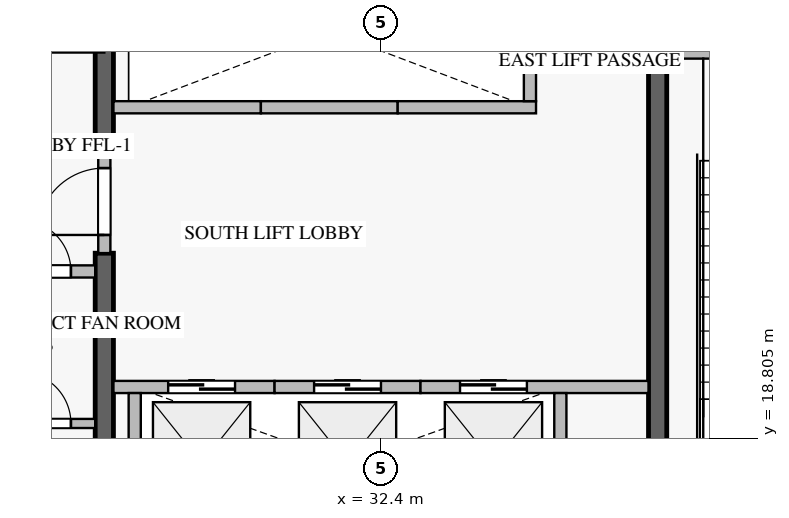
"""IFC4 building model, lengths in metres.
Left out: names, types, materials, properties, quantities, classifications, styles, units other than length and angle.
Written with IfcOpenShell. Run it as: python <this file> out.ifc"""

import sys

from ifc_helpers import new_model, si_unit, direction, frame, frame_2d, origin, place, context, subcontext, project, spatial, rectangle, extrude, source, transform, mapped, element, fill, save


model = new_model("IFC4")
c1 = context("Model", 3, precision=1e-05, world=origin(), true_north=direction((0.0, 1.0)))
c2 = subcontext(c1, "Body", "Model", "MODEL_VIEW")
j1 = project(units=[si_unit("LENGTHUNIT", "METRE"), si_unit("PLANEANGLEUNIT", "RADIAN")], contexts=[c1])
p1 = place(None, origin())
s1 = spatial("IfcSite", under=j1, at=p1, CompositionType="ELEMENT")
p2 = place(p1, origin())
s2 = spatial("IfcBuilding", under=s1, at=p2, CompositionType="ELEMENT")
p3 = place(p2, frame((0.0, 0.0, 15.3)))
s3 = spatial("IfcBuildingStorey", under=s2, at=p3, CompositionType="ELEMENT", Elevation=15.3)
p4 = place(p3, frame((27.85, 17.025, -0.38), z_axis=(0.0, 0.0, 1.0), x_axis=(0.0, 1.0, 0.0)))
e1 = element("IfcWall", 1, at=p4, inside=s3, PredefinedType="SHEAR", context=c2, shape_type="SweptSolid", body=[
    extrude(rectangle(XDim=4.825, YDim=0.3, at=frame_2d((2.413, 0.0))), origin(), (0.0, 0.0, 1.0), 5.228),
])
p5 = place(p3, frame((27.85, 23.55, -0.38), z_axis=(0.0, 0.0, 1.0), x_axis=(0.0, 1.0, 0.0)))
e2 = element("IfcWall", 2, at=p5, inside=s3, PredefinedType="SHEAR", context=c2, shape_type="SweptSolid", body=[
    extrude(rectangle(XDim=9.825, YDim=0.3, at=frame_2d((4.913, 0.0))), origin(), (0.0, 0.0, 1.0), 5.228),
])
p6 = place(p3, frame((36.95, 17.025, -0.38), z_axis=(0.0, 0.0, 1.0), x_axis=(0.0, 1.0, 0.0)))
e3 = element("IfcWall", 3, at=p6, inside=s3, PredefinedType="SHEAR", context=c2, shape_type="SweptSolid", body=[
    extrude(rectangle(XDim=8.325, YDim=0.3, at=frame_2d((4.163, 0.0))), origin(), (0.0, 0.0, 1.0), 5.228),
])
p7 = place(p3, frame((36.95, 25.15, 0.0), z_axis=(0.0, 0.0, 1.0), x_axis=(1.0, 0.0, 0.0)))
e4 = element("IfcWall", 4, at=p7, inside=s3, PredefinedType="STANDARD", context=c2, shape_type="SweptSolid", body=[
    extrude(rectangle(XDim=4.45, YDim=0.2, at=frame_2d((2.225, 0.0))), origin(), (0.0, 0.0, 1.0), 4.85),
])
p8 = place(p7, frame((1.65, 0.0, 0.0)))
e5 = element("IfcOpeningElement", 5, at=p8, cuts=e4, PredefinedType="OPENING", context=c2, shape_type="SweptSolid", body=[
    extrude(rectangle(XDim=1.1, YDim=2.15, at=frame_2d((0.55, 1.075))), frame((0.0, 0.11, 0.0), z_axis=(0.0, -1.0, 0.0), x_axis=(1.0, 0.0, 0.0)), (0.0, 0.0, 1.0), 0.22),
])
p9 = place(p3, frame((28.0, 19.65, 0.0), z_axis=(0.0, 0.0, 1.0), x_axis=(1.0, 0.0, 0.0)))
e6 = element("IfcWall", 6, at=p9, inside=s3, PredefinedType="STANDARD", context=c2, shape_type="SweptSolid", body=[
    extrude(rectangle(XDim=2.65, YDim=0.2, at=frame_2d((1.325, 0.0))), origin(), (0.0, 0.0, 1.0), 4.85),
])
p10 = place(p9, frame((0.9, 0.0, 0.0)))
e7 = element("IfcOpeningElement", 7, at=p10, cuts=e6, PredefinedType="OPENING", context=c2, shape_type="SweptSolid", body=[
    extrude(rectangle(XDim=1.1, YDim=2.2, at=frame_2d((0.55, 1.1))), frame((0.0, 0.11, 0.0), z_axis=(0.0, -1.0, 0.0), x_axis=(1.0, 0.0, 0.0)), (0.0, 0.0, 1.0), 0.22),
])
p11 = place(p3, frame((28.35, 17.025, 0.0), z_axis=(0.0, 0.0, 1.0), x_axis=(0.0, 1.0, 0.0)))
e8 = element("IfcWall", 8, at=p11, inside=s3, PredefinedType="STANDARD", context=c2, shape_type="SweptSolid", body=[
    extrude(rectangle(XDim=2.525, YDim=0.2, at=frame_2d((1.263, 0.0))), origin(), (0.0, 0.0, 1.0), 4.85),
])
p12 = place(p3, frame((30.65, 19.65, 0.0), z_axis=(0.0, 0.0, 1.0), x_axis=(1.0, 0.0, 0.0)))
e9 = element("IfcWall", 9, at=p12, inside=s3, PredefinedType="STANDARD", context=c2, shape_type="SweptSolid", body=[
    extrude(rectangle(XDim=2.4, YDim=0.2, at=frame_2d((1.2, 0.0))), origin(), (0.0, 0.0, 1.0), 4.85),
])
p13 = place(p12, frame((0.65, 0.0, 0.0)))
e10 = element("IfcOpeningElement", 10, at=p13, cuts=e9, PredefinedType="OPENING", context=c2, shape_type="SweptSolid", body=[
    extrude(rectangle(XDim=1.1, YDim=2.2, at=frame_2d((0.55, 1.1))), frame((0.0, 0.11, 0.0), z_axis=(0.0, -1.0, 0.0), x_axis=(1.0, 0.0, 0.0)), (0.0, 0.0, 1.0), 0.22),
])
p14 = place(p3, frame((33.05, 19.65, 0.0), z_axis=(0.0, 0.0, 1.0), x_axis=(1.0, 0.0, 0.0)))
e11 = element("IfcWall", 11, at=p14, inside=s3, PredefinedType="STANDARD", context=c2, shape_type="SweptSolid", body=[
    extrude(rectangle(XDim=3.75, YDim=0.2, at=frame_2d((1.875, 0.0))), origin(), (0.0, 0.0, 1.0), 4.85),
])
p15 = place(p14, frame((0.65, 0.0, 0.0)))
e12 = element("IfcOpeningElement", 12, at=p15, cuts=e11, PredefinedType="OPENING", context=c2, shape_type="SweptSolid", body=[
    extrude(rectangle(XDim=1.1, YDim=2.2, at=frame_2d((0.55, 1.1))), frame((0.0, 0.11, 0.0), z_axis=(0.0, -1.0, 0.0), x_axis=(1.0, 0.0, 0.0)), (0.0, 0.0, 1.0), 0.22),
])
p16 = place(p3, frame((35.35, 17.025, 0.0), z_axis=(0.0, 0.0, 1.0), x_axis=(0.0, 1.0, 0.0)))
e13 = element("IfcWall", 13, at=p16, inside=s3, PredefinedType="STANDARD", context=c2, shape_type="SweptSolid", body=[
    extrude(rectangle(XDim=2.525, YDim=0.2, at=frame_2d((1.263, 0.0))), origin(), (0.0, 0.0, 1.0), 4.85),
])
p17 = place(p3, frame((28.0, 24.25, 0.0), z_axis=(0.0, 0.0, 1.0), x_axis=(1.0, 0.0, 0.0)))
e14 = element("IfcWall", 14, at=p17, inside=s3, PredefinedType="STANDARD", context=c2, shape_type="SweptSolid", body=[
    extrude(rectangle(XDim=2.425, YDim=0.2, at=frame_2d((1.212, 0.0))), origin(), (0.0, 0.0, 1.0), 4.85),
])
p18 = place(p3, frame((30.425, 24.25, 0.0), z_axis=(0.0, 0.0, 1.0), x_axis=(1.0, 0.0, 0.0)))
e15 = element("IfcWall", 15, at=p18, inside=s3, PredefinedType="STANDARD", context=c2, shape_type="SweptSolid", body=[
    extrude(rectangle(XDim=2.25, YDim=0.2, at=frame_2d((1.125, 0.0))), origin(), (0.0, 0.0, 1.0), 4.85),
])
p19 = place(p3, frame((32.675, 24.25, 0.0), z_axis=(0.0, 0.0, 1.0), x_axis=(1.0, 0.0, 0.0)))
e16 = element("IfcWall", 16, at=p19, inside=s3, PredefinedType="STANDARD", context=c2, shape_type="SweptSolid", body=[
    extrude(rectangle(XDim=2.275, YDim=0.2, at=frame_2d((1.137, 0.0))), origin(), (0.0, 0.0, 1.0), 4.85),
])
p20 = place(p3, frame((34.85, 24.35, 0.0), z_axis=(0.0, 0.0, 1.0), x_axis=(0.0, 1.0, 0.0)))
e17 = element("IfcWall", 17, at=p20, inside=s3, PredefinedType="STANDARD", context=c2, shape_type="SweptSolid", body=[
    extrude(rectangle(XDim=2.5, YDim=0.2, at=frame_2d((1.25, 0.0))), origin(), (0.0, 0.0, 1.0), 4.85),
])
p21 = place(p3, frame((26.052, 21.55, 0.0), z_axis=(0.0, 0.0, 1.0), x_axis=(1.0, 0.0, 0.0)))
e18 = element("IfcWall", 18, at=p21, inside=s3, PredefinedType="STANDARD", context=c2, shape_type="SweptSolid", body=[
    extrude(rectangle(XDim=1.648, YDim=0.2, at=frame_2d((0.824, 0.0))), origin(), (0.0, 0.0, 1.0), 4.85),
])
p22 = place(p21, frame((0.399, 0.0, 0.0)))
e19 = element("IfcOpeningElement", 19, at=p22, cuts=e18, PredefinedType="OPENING", context=c2, shape_type="SweptSolid", body=[
    extrude(rectangle(XDim=0.85, YDim=2.1, at=frame_2d((0.425, 1.05))), frame((0.0, 0.11, 0.0), z_axis=(0.0, -1.0, 0.0), x_axis=(1.0, 0.0, 0.0)), (0.0, 0.0, 1.0), 0.22),
])
p23 = place(p3, frame((27.85, 21.852, 0.0), z_axis=(0.0, 0.0, 1.0), x_axis=(0.0, 1.0, 0.0)))
e20 = element("IfcWall", 20, at=p23, inside=s3, PredefinedType="STANDARD", context=c2, shape_type="SweptSolid", body=[
    extrude(rectangle(XDim=1.696, YDim=0.2, at=frame_2d((0.848, 0.0))), origin(), (0.0, 0.0, 1.0), 4.85),
])
p24 = place(p23, frame((0.298, 0.0, 0.0)))
e21 = element("IfcOpeningElement", 21, at=p24, cuts=e20, PredefinedType="OPENING", context=c2, shape_type="SweptSolid", body=[
    extrude(rectangle(XDim=1.1, YDim=2.15, at=frame_2d((0.55, 1.075))), frame((0.0, 0.11, 0.0), z_axis=(0.0, -1.0, 0.0), x_axis=(1.0, 0.0, 0.0)), (0.0, 0.0, 1.0), 0.22),
])
p25 = place(p3, frame((26.052, 19.05, 0.0), z_axis=(0.0, 0.0, 1.0), x_axis=(1.0, 0.0, 0.0)))
e22 = element("IfcWall", 22, at=p25, inside=s3, PredefinedType="PARTITIONING", context=c2, shape_type="SweptSolid", body=[
    extrude(rectangle(XDim=1.648, YDim=0.15, at=frame_2d((0.824, 0.0))), origin(), (0.0, 0.0, 1.0), 4.85),
])
p26 = place(p25, frame((0.399, 0.0, 0.0)))
e23 = element("IfcOpeningElement", 23, at=p26, cuts=e22, PredefinedType="OPENING", context=c2, shape_type="SweptSolid", body=[
    extrude(rectangle(XDim=0.85, YDim=2.1, at=frame_2d((0.425, 1.05))), frame((0.0, 0.085, 0.0), z_axis=(0.0, -1.0, 0.0), x_axis=(1.0, 0.0, 0.0)), (0.0, 0.0, 1.0), 0.17),
])
m1 = source(origin(), c2, "Body", "SweptSolid", [
    extrude(rectangle(XDim=1.1, YDim=2.2, at=frame_2d((0.55, 1.1))), frame((0.0, 0.025, 0.0), z_axis=(0.0, -1.0, 0.0), x_axis=(1.0, 0.0, 0.0)), (0.0, 0.0, 1.0), 0.05),
])
p27 = place(p10, origin())
e24 = element("IfcDoor", 24, at=p27, inside=s3, OperationType="DOUBLE_DOOR_SLIDING", PredefinedType="DOOR", context=c2, shape_type="MappedRepresentation", body=[
    mapped(m1, transform((0.0, 0.0, 0.0), scale=1.0)),
])
fill(e7, e24)
p28 = place(p13, origin())
e25 = element("IfcDoor", 25, at=p28, inside=s3, OperationType="DOUBLE_DOOR_SLIDING", PredefinedType="DOOR", context=c2, shape_type="MappedRepresentation", body=[
    mapped(m1, transform((0.0, 0.0, 0.0), scale=1.0)),
])
fill(e10, e25)
p29 = place(p15, origin())
e26 = element("IfcDoor", 26, at=p29, inside=s3, OperationType="DOUBLE_DOOR_SLIDING", PredefinedType="DOOR", context=c2, shape_type="MappedRepresentation", body=[
    mapped(m1, transform((0.0, 0.0, 0.0), scale=1.0)),
])
fill(e12, e26)
m2 = source(origin(), c2, "Body", "SweptSolid", [
    extrude(rectangle(XDim=0.85, YDim=2.1, at=frame_2d((0.425, 1.05))), frame((0.0, 0.025, 0.0), z_axis=(0.0, -1.0, 0.0), x_axis=(1.0, 0.0, 0.0)), (0.0, 0.0, 1.0), 0.05),
])
p30 = place(p22, origin())
e27 = element("IfcDoor", 27, at=p30, inside=s3, OperationType="SINGLE_SWING_LEFT", PredefinedType="DOOR", context=c2, shape_type="MappedRepresentation", body=[
    mapped(m2, transform((0.0, 0.0, 0.0), scale=1.0)),
])
fill(e19, e27)
m3 = source(origin(), c2, "Body", "SweptSolid", [
    extrude(rectangle(XDim=1.1, YDim=2.15, at=frame_2d((0.55, 1.075))), frame((0.0, 0.025, 0.0), z_axis=(0.0, -1.0, 0.0), x_axis=(1.0, 0.0, 0.0)), (0.0, 0.0, 1.0), 0.05),
])
p31 = place(p24, origin())
e28 = element("IfcDoor", 28, at=p31, inside=s3, OperationType="SINGLE_SWING_LEFT", PredefinedType="DOOR", context=c2, shape_type="MappedRepresentation", body=[
    mapped(m3, transform((0.0, 0.0, 0.0), scale=1.0)),
])
fill(e21, e28)
p32 = place(p26, origin())
e29 = element("IfcDoor", 29, at=p32, inside=s3, OperationType="SINGLE_SWING_LEFT", PredefinedType="DOOR", context=c2, shape_type="MappedRepresentation", body=[
    mapped(m2, transform((0.0, 0.0, 0.0), scale=1.0)),
])
fill(e23, e29)
save(model, sys.argv[1])
